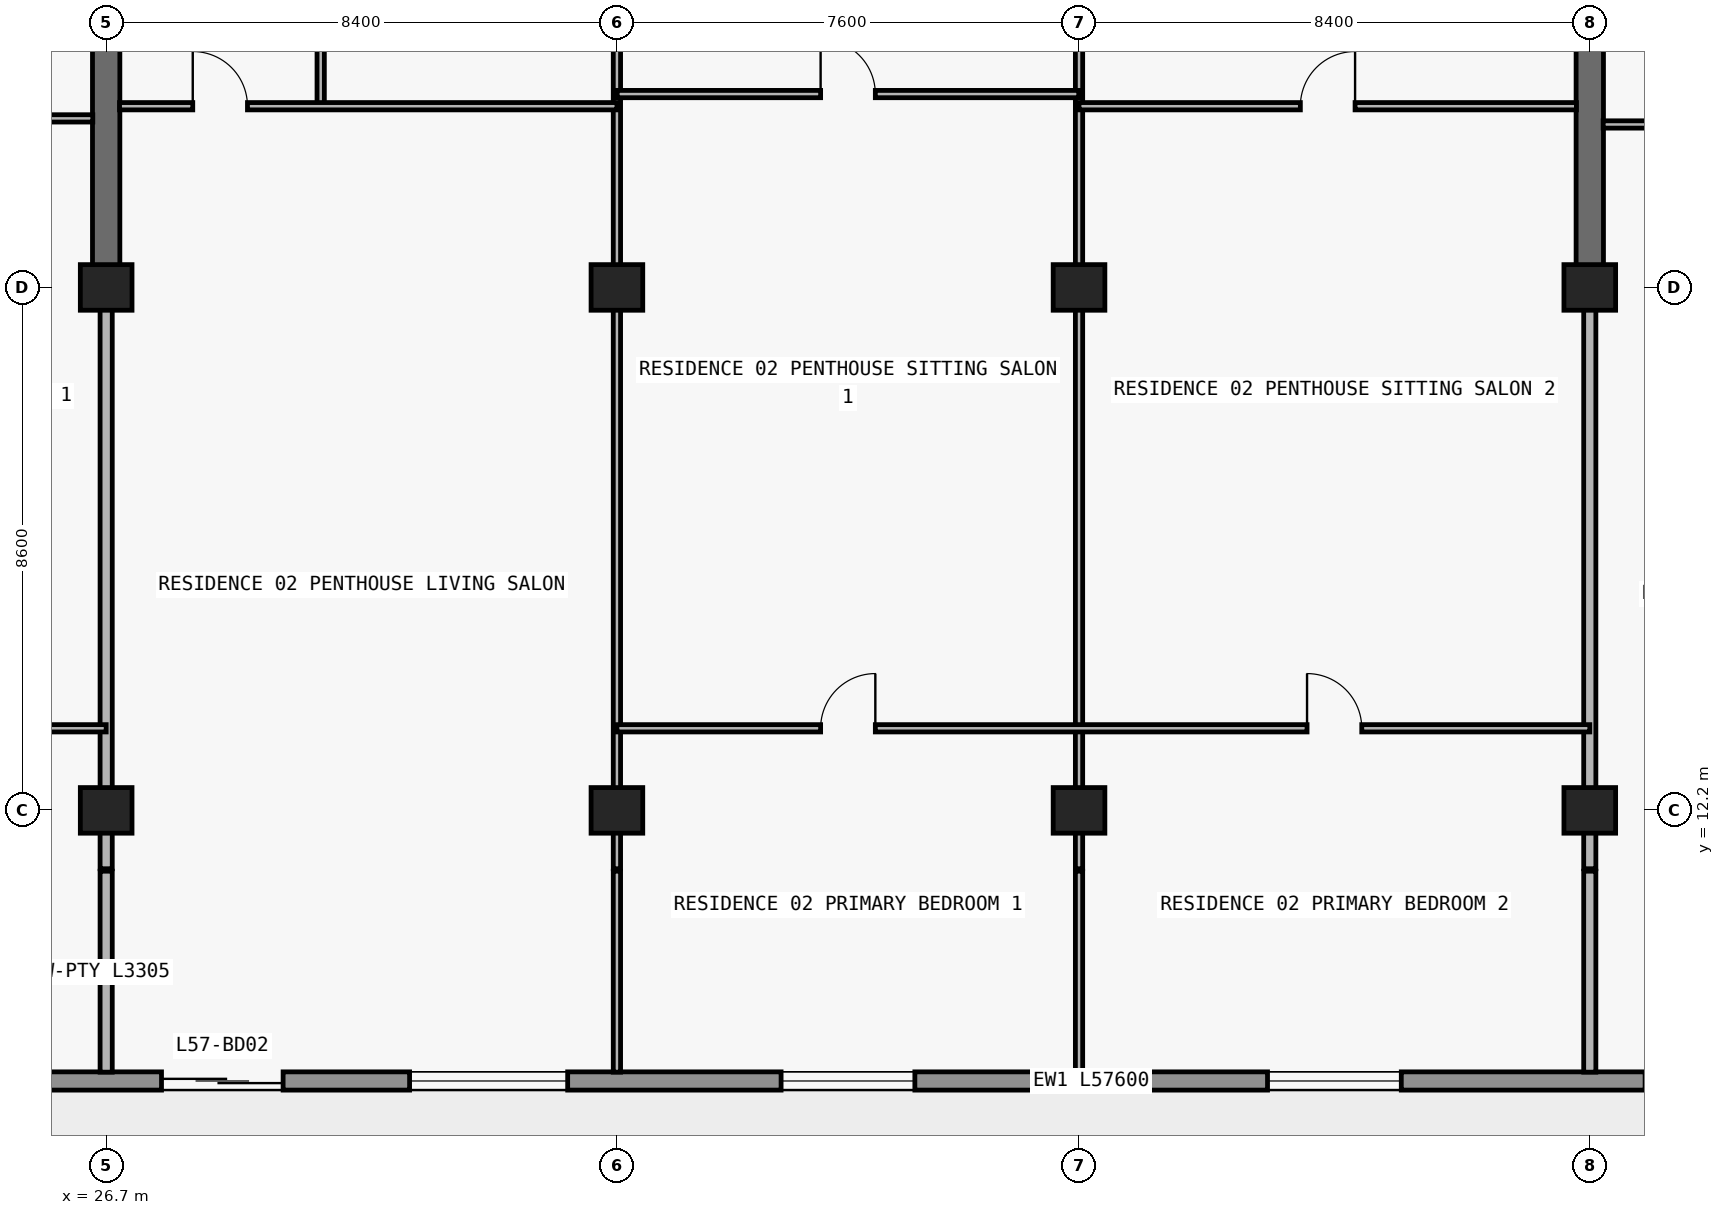
"""IFC4 building model, lengths in metres.
Left out: names, types, materials, properties, quantities, classifications, styles, units other than length and angle.
Written with IfcOpenShell. Run it as: python <this file> out.ifc"""

import sys

from ifc_helpers import new_model, si_unit, direction, frame, frame_2d, origin, origin_2d, place, context, subcontext, project, spatial, rectangle, extrude, element, fill, save


model = new_model("IFC4")
c1 = context("Model", 3, precision=1e-05, world=origin(), true_north=direction((0.0, 1.0)))
c2 = subcontext(c1, "Body", "Model", "MODEL_VIEW")
j1 = project(units=[si_unit("LENGTHUNIT", "METRE"), si_unit("PLANEANGLEUNIT", "RADIAN")], contexts=[c1])
p1 = place(None, origin())
s1 = spatial("IfcSite", under=j1, at=p1, CompositionType="ELEMENT")
p2 = place(p1, origin())
s2 = spatial("IfcBuilding", under=s1, at=p2, CompositionType="ELEMENT")
p3 = place(p2, frame((0.0, 0.0, 204.9)))
s3 = spatial("IfcBuildingStorey", under=s2, at=p3, CompositionType="ELEMENT", Elevation=204.9)
for number, where, z_axis, x_axis in (
    (1, (26.7, 12.2, 0.0), (0.0, 0.0, 1.0), (1.0, 0.0, 0.0)),
    (2, (35.1, 12.2, 0.0), (0.0, 0.0, 1.0), (1.0, 0.0, 0.0)),
    (3, (42.7, 12.2, 0.0), (0.0, 0.0, 1.0), (1.0, 0.0, 0.0)),
    (4, (51.1, 12.2, 0.0), (0.0, 0.0, 1.0), (1.0, 0.0, 0.0)),
    (5, (26.7, 20.8, 0.0), (0.0, 0.0, 1.0), (1.0, 0.0, 0.0)),
    (6, (35.1, 20.8, 0.0), (0.0, 0.0, 1.0), (1.0, 0.0, 0.0)),
    (7, (42.7, 20.8, 0.0), (0.0, 0.0, 1.0), (1.0, 0.0, 0.0)),
    (8, (51.1, 20.8, 0.0), (0.0, 0.0, 1.0), (1.0, 0.0, 0.0)),
):
    element("IfcColumn", number, at=place(p3, frame(where, z_axis=z_axis, x_axis=x_axis)), inside=s3, PredefinedType="COLUMN", context=c2, shape_type="SweptSolid", body=[
        extrude(rectangle(XDim=0.85, YDim=0.75, at=origin_2d()), origin(), (0.0, 0.0, 1.0), 3.05),
    ])
for number, where, z_axis, x_axis in (
    (9, (26.7, 20.8, 0.0), (0.0, 0.0, 1.0), (0.0, 1.0, 0.0)),
    (10, (51.1, 20.8, 0.0), (0.0, 0.0, 1.0), (0.0, 1.0, 0.0)),
):
    element("IfcWall", number, at=place(p3, frame(where, z_axis=z_axis, x_axis=x_axis)), inside=s3, PredefinedType="SHEAR", context=c2, shape_type="SweptSolid", body=[
        extrude(rectangle(XDim=8.6, YDim=0.45, at=frame_2d((4.3, 0.0))), origin(), (0.0, 0.0, 1.0), 3.05),
    ])
p4 = place(p3, frame((67.7, 7.75, 0.0), z_axis=(0.0, 0.0, 1.0), x_axis=(-1.0, 0.0, 0.0)))
e11 = element("IfcWall", 11, at=p4, inside=s3, PredefinedType="STANDARD", context=c2, shape_type="SweptSolid", body=[
    extrude(rectangle(XDim=57.6, YDim=0.3, at=frame_2d((28.8, 0.0))), origin(), (0.0, 0.0, 1.0), 3.05),
])
p5 = place(p4, frame((54.69, 0.0, 0.0)))
e12 = element("IfcOpeningElement", 12, at=p5, cuts=e11, PredefinedType="OPENING", context=c2, shape_type="SweptSolid", body=[
    extrude(rectangle(XDim=2.0, YDim=2.3, at=frame_2d((1.0, 1.15))), frame((0.0, 0.16, 0.0), z_axis=(0.0, -1.0, 0.0), x_axis=(1.0, 0.0, 0.0)), (0.0, 0.0, 1.0), 0.32),
])
p6 = place(p4, frame((50.21, 0.0, 0.65)))
e13 = element("IfcOpeningElement", 13, at=p6, cuts=e11, PredefinedType="OPENING", context=c2, shape_type="SweptSolid", body=[
    extrude(rectangle(XDim=2.6, YDim=1.85, at=frame_2d((1.3, 0.925))), frame((0.0, 0.16, 0.0), z_axis=(0.0, -1.0, 0.0), x_axis=(1.0, 0.0, 0.0)), (0.0, 0.0, 1.0), 0.32),
])
p7 = place(p4, frame((44.1, 0.0, 0.85)))
e14 = element("IfcOpeningElement", 14, at=p7, cuts=e11, PredefinedType="OPENING", context=c2, shape_type="SweptSolid", body=[
    extrude(rectangle(XDim=2.2, YDim=1.55, at=frame_2d((1.1, 0.775))), frame((0.0, 0.16, 0.0), z_axis=(0.0, -1.0, 0.0), x_axis=(1.0, 0.0, 0.0)), (0.0, 0.0, 1.0), 0.32),
])
p8 = place(p4, frame((38.09, 0.0, 0.0)))
e15 = element("IfcOpeningElement", 15, at=p8, cuts=e11, PredefinedType="OPENING", context=c2, shape_type="SweptSolid", body=[
    extrude(rectangle(XDim=2.0, YDim=2.3, at=frame_2d((1.0, 1.15))), frame((0.0, 0.16, 0.0), z_axis=(0.0, -1.0, 0.0), x_axis=(1.0, 0.0, 0.0)), (0.0, 0.0, 1.0), 0.32),
])
p9 = place(p4, frame((33.41, 0.0, 0.65)))
e16 = element("IfcOpeningElement", 16, at=p9, cuts=e11, PredefinedType="OPENING", context=c2, shape_type="SweptSolid", body=[
    extrude(rectangle(XDim=2.6, YDim=1.85, at=frame_2d((1.3, 0.925))), frame((0.0, 0.16, 0.0), z_axis=(0.0, -1.0, 0.0), x_axis=(1.0, 0.0, 0.0)), (0.0, 0.0, 1.0), 0.32),
])
p10 = place(p4, frame((27.7, 0.0, 0.85)))
e17 = element("IfcOpeningElement", 17, at=p10, cuts=e11, PredefinedType="OPENING", context=c2, shape_type="SweptSolid", body=[
    extrude(rectangle(XDim=2.2, YDim=1.55, at=frame_2d((1.1, 0.775))), frame((0.0, 0.16, 0.0), z_axis=(0.0, -1.0, 0.0), x_axis=(1.0, 0.0, 0.0)), (0.0, 0.0, 1.0), 0.32),
])
p11 = place(p4, frame((19.7, 0.0, 0.85)))
e18 = element("IfcOpeningElement", 18, at=p11, cuts=e11, PredefinedType="OPENING", context=c2, shape_type="SweptSolid", body=[
    extrude(rectangle(XDim=2.2, YDim=1.55, at=frame_2d((1.1, 0.775))), frame((0.0, 0.16, 0.0), z_axis=(0.0, -1.0, 0.0), x_axis=(1.0, 0.0, 0.0)), (0.0, 0.0, 1.0), 0.32),
])
p12 = place(p4, frame((13.69, 0.0, 0.0)))
e19 = element("IfcOpeningElement", 19, at=p12, cuts=e11, PredefinedType="OPENING", context=c2, shape_type="SweptSolid", body=[
    extrude(rectangle(XDim=2.0, YDim=2.3, at=frame_2d((1.0, 1.15))), frame((0.0, 0.16, 0.0), z_axis=(0.0, -1.0, 0.0), x_axis=(1.0, 0.0, 0.0)), (0.0, 0.0, 1.0), 0.32),
])
p13 = place(p4, frame((9.01, 0.0, 0.65)))
e20 = element("IfcOpeningElement", 20, at=p13, cuts=e11, PredefinedType="OPENING", context=c2, shape_type="SweptSolid", body=[
    extrude(rectangle(XDim=2.6, YDim=1.85, at=frame_2d((1.3, 0.925))), frame((0.0, 0.16, 0.0), z_axis=(0.0, -1.0, 0.0), x_axis=(1.0, 0.0, 0.0)), (0.0, 0.0, 1.0), 0.32),
])
p14 = place(p4, frame((3.0, 0.0, 0.85)))
e21 = element("IfcOpeningElement", 21, at=p14, cuts=e11, PredefinedType="OPENING", context=c2, shape_type="SweptSolid", body=[
    extrude(rectangle(XDim=2.2, YDim=1.55, at=frame_2d((1.1, 0.775))), frame((0.0, 0.16, 0.0), z_axis=(0.0, -1.0, 0.0), x_axis=(1.0, 0.0, 0.0)), (0.0, 0.0, 1.0), 0.32),
])
p15 = place(p3, frame((26.7, 7.895, 0.0), z_axis=(0.0, 0.0, 1.0), x_axis=(0.0, 1.0, 0.0)))
e22 = element("IfcWall", 22, at=p15, inside=s3, PredefinedType="PARTITIONING", context=c2, shape_type="SweptSolid", body=[
    extrude(rectangle(XDim=3.305, YDim=0.2, at=frame_2d((1.652, 0.0))), origin(), (0.0, 0.0, 1.0), 3.05),
])
p16 = place(p3, frame((26.7, 11.24, 0.0), z_axis=(0.0, 0.0, 1.0), x_axis=(0.0, 1.0, 0.0)))
e23 = element("IfcWall", 23, at=p16, inside=s3, PredefinedType="PARTITIONING", context=c2, shape_type="SweptSolid", body=[
    extrude(rectangle(XDim=9.555, YDim=0.2, at=frame_2d((4.777, 0.0))), origin(), (0.0, 0.0, 1.0), 2.263),
])
p17 = place(p3, frame((30.228, 23.78, 0.0), z_axis=(0.0, 0.0, 1.0), x_axis=(0.0, 1.0, 0.0)))
e24 = element("IfcWall", 24, at=p17, inside=s3, PredefinedType="PARTITIONING", context=c2, shape_type="SweptSolid", body=[
    extrude(rectangle(XDim=4.8, YDim=0.12, at=frame_2d((2.4, 0.0))), origin(), (0.0, 0.0, 1.0), 3.05),
])
p18 = place(p17, frame((1.95, 0.0, 0.0)))
e25 = element("IfcOpeningElement", 25, at=p18, cuts=e24, PredefinedType="OPENING", context=c2, shape_type="SweptSolid", body=[
    extrude(rectangle(XDim=0.9, YDim=2.15, at=frame_2d((0.45, 1.075))), frame((0.0, 0.07, 0.0), z_axis=(0.0, -1.0, 0.0), x_axis=(1.0, 0.0, 0.0)), (0.0, 0.0, 1.0), 0.14),
])
p19 = place(p3, frame((35.1, 7.895, 0.0), z_axis=(0.0, 0.0, 1.0), x_axis=(0.0, 1.0, 0.0)))
e26 = element("IfcWall", 26, at=p19, inside=s3, PredefinedType="PARTITIONING", context=c2, shape_type="SweptSolid", body=[
    extrude(rectangle(XDim=3.305, YDim=0.12, at=frame_2d((1.652, 0.0))), origin(), (0.0, 0.0, 1.0), 3.05),
])
p20 = place(p3, frame((35.1, 11.24, 0.0), z_axis=(0.0, 0.0, 1.0), x_axis=(0.0, 1.0, 0.0)))
e27 = element("IfcWall", 27, at=p20, inside=s3, PredefinedType="PARTITIONING", context=c2, shape_type="SweptSolid", body=[
    extrude(rectangle(XDim=22.76, YDim=0.12, at=frame_2d((11.38, 0.0))), origin(), (0.0, 0.0, 1.0), 2.263),
])
p21 = place(p20, frame((14.49, 0.0, 0.0)))
e28 = element("IfcOpeningElement", 28, at=p21, cuts=e27, PredefinedType="OPENING", context=c2, shape_type="SweptSolid", body=[
    extrude(rectangle(XDim=0.9, YDim=2.15, at=frame_2d((0.45, 1.075))), frame((0.0, 0.07, 0.0), z_axis=(0.0, -1.0, 0.0), x_axis=(1.0, 0.0, 0.0)), (0.0, 0.0, 1.0), 0.14),
])
p22 = place(p3, frame((42.7, 7.895, 0.0), z_axis=(0.0, 0.0, 1.0), x_axis=(0.0, 1.0, 0.0)))
e29 = element("IfcWall", 29, at=p22, inside=s3, PredefinedType="PARTITIONING", context=c2, shape_type="SweptSolid", body=[
    extrude(rectangle(XDim=3.305, YDim=0.12, at=frame_2d((1.652, 0.0))), origin(), (0.0, 0.0, 1.0), 3.05),
])
p23 = place(p3, frame((42.7, 11.24, 0.0), z_axis=(0.0, 0.0, 1.0), x_axis=(0.0, 1.0, 0.0)))
e30 = element("IfcWall", 30, at=p23, inside=s3, PredefinedType="PARTITIONING", context=c2, shape_type="SweptSolid", body=[
    extrude(rectangle(XDim=22.76, YDim=0.12, at=frame_2d((11.38, 0.0))), origin(), (0.0, 0.0, 1.0), 2.263),
])
p24 = place(p23, frame((14.49, 0.0, 0.0)))
e31 = element("IfcOpeningElement", 31, at=p24, cuts=e30, PredefinedType="OPENING", context=c2, shape_type="SweptSolid", body=[
    extrude(rectangle(XDim=0.9, YDim=2.15, at=frame_2d((0.45, 1.075))), frame((0.0, 0.07, 0.0), z_axis=(0.0, -1.0, 0.0), x_axis=(1.0, 0.0, 0.0)), (0.0, 0.0, 1.0), 0.14),
])
p25 = place(p3, frame((51.1, 7.895, 0.0), z_axis=(0.0, 0.0, 1.0), x_axis=(0.0, 1.0, 0.0)))
e32 = element("IfcWall", 32, at=p25, inside=s3, PredefinedType="PARTITIONING", context=c2, shape_type="SweptSolid", body=[
    extrude(rectangle(XDim=3.305, YDim=0.2, at=frame_2d((1.652, 0.0))), origin(), (0.0, 0.0, 1.0), 3.05),
])
p26 = place(p3, frame((51.1, 11.24, 0.0), z_axis=(0.0, 0.0, 1.0), x_axis=(0.0, 1.0, 0.0)))
e33 = element("IfcWall", 33, at=p26, inside=s3, PredefinedType="PARTITIONING", context=c2, shape_type="SweptSolid", body=[
    extrude(rectangle(XDim=9.555, YDim=0.2, at=frame_2d((4.777, 0.0))), origin(), (0.0, 0.0, 1.0), 2.263),
])
p27 = place(p3, frame((18.3, 13.55, 0.0), z_axis=(0.0, 0.0, 1.0), x_axis=(1.0, 0.0, 0.0)))
e34 = element("IfcWall", 34, at=p27, inside=s3, PredefinedType="PARTITIONING", context=c2, shape_type="SweptSolid", body=[
    extrude(rectangle(XDim=8.4, YDim=0.12, at=frame_2d((4.2, 0.0))), origin(), (0.0, 0.0, 1.0), 3.05),
])
p28 = place(p27, frame((3.75, 0.0, 0.0)))
e35 = element("IfcOpeningElement", 35, at=p28, cuts=e34, PredefinedType="OPENING", context=c2, shape_type="SweptSolid", body=[
    extrude(rectangle(XDim=0.9, YDim=2.15, at=frame_2d((0.45, 1.075))), frame((0.0, 0.07, 0.0), z_axis=(0.0, -1.0, 0.0), x_axis=(1.0, 0.0, 0.0)), (0.0, 0.0, 1.0), 0.14),
])
p29 = place(p3, frame((35.1, 13.55, 0.0), z_axis=(0.0, 0.0, 1.0), x_axis=(1.0, 0.0, 0.0)))
e36 = element("IfcWall", 36, at=p29, inside=s3, PredefinedType="PARTITIONING", context=c2, shape_type="SweptSolid", body=[
    extrude(rectangle(XDim=16.0, YDim=0.12, at=frame_2d((8.0, 0.0))), origin(), (0.0, 0.0, 1.0), 3.05),
])
p30 = place(p29, frame((3.35, 0.0, 0.0)))
e37 = element("IfcOpeningElement", 37, at=p30, cuts=e36, PredefinedType="OPENING", context=c2, shape_type="SweptSolid", body=[
    extrude(rectangle(XDim=0.9, YDim=2.15, at=frame_2d((0.45, 1.075))), frame((0.0, 0.07, 0.0), z_axis=(0.0, -1.0, 0.0), x_axis=(1.0, 0.0, 0.0)), (0.0, 0.0, 1.0), 0.14),
])
p31 = place(p29, frame((11.35, 0.0, 0.0)))
e38 = element("IfcOpeningElement", 38, at=p31, cuts=e36, PredefinedType="OPENING", context=c2, shape_type="SweptSolid", body=[
    extrude(rectangle(XDim=0.9, YDim=2.15, at=frame_2d((0.45, 1.075))), frame((0.0, 0.07, 0.0), z_axis=(0.0, -1.0, 0.0), x_axis=(1.0, 0.0, 0.0)), (0.0, 0.0, 1.0), 0.14),
])
p32 = place(p3, frame((51.32, 23.48, 0.0), z_axis=(0.0, 0.0, 1.0), x_axis=(1.0, 0.0, 0.0)))
e39 = element("IfcWall", 39, at=p32, inside=s3, PredefinedType="PARTITIONING", context=c2, shape_type="SweptSolid", body=[
    extrude(rectangle(XDim=8.18, YDim=0.12, at=frame_2d((4.09, 0.0))), origin(), (0.0, 0.0, 1.0), 3.05),
])
p33 = place(p32, frame((1.33, 0.0, 0.0)))
e40 = element("IfcOpeningElement", 40, at=p33, cuts=e39, PredefinedType="OPENING", context=c2, shape_type="SweptSolid", body=[
    extrude(rectangle(XDim=0.9, YDim=2.15, at=frame_2d((0.45, 1.075))), frame((0.0, 0.07, 0.0), z_axis=(0.0, -1.0, 0.0), x_axis=(1.0, 0.0, 0.0)), (0.0, 0.0, 1.0), 0.14),
])
p34 = place(p3, frame((18.305, 23.58, 0.0), z_axis=(0.0, 0.0, 1.0), x_axis=(1.0, 0.0, 0.0)))
e41 = element("IfcWall", 41, at=p34, inside=s3, PredefinedType="PARTITIONING", context=c2, shape_type="SweptSolid", body=[
    extrude(rectangle(XDim=8.175, YDim=0.12, at=frame_2d((4.087, 0.0))), origin(), (0.0, 0.0, 1.0), 3.05),
])
p35 = place(p34, frame((3.637, 0.0, 0.0)))
e42 = element("IfcOpeningElement", 42, at=p35, cuts=e41, PredefinedType="OPENING", context=c2, shape_type="SweptSolid", body=[
    extrude(rectangle(XDim=0.9, YDim=2.15, at=frame_2d((0.45, 1.075))), frame((0.0, 0.07, 0.0), z_axis=(0.0, -1.0, 0.0), x_axis=(1.0, 0.0, 0.0)), (0.0, 0.0, 1.0), 0.14),
])
p36 = place(p3, frame((26.92, 23.78, 0.0), z_axis=(0.0, 0.0, 1.0), x_axis=(1.0, 0.0, 0.0)))
e43 = element("IfcWall", 43, at=p36, inside=s3, PredefinedType="PARTITIONING", context=c2, shape_type="SweptSolid", body=[
    extrude(rectangle(XDim=8.18, YDim=0.12, at=frame_2d((4.09, 0.0))), origin(), (0.0, 0.0, 1.0), 3.05),
])
p37 = place(p36, frame((1.204, 0.0, 0.0)))
e44 = element("IfcOpeningElement", 44, at=p37, cuts=e43, PredefinedType="OPENING", context=c2, shape_type="SweptSolid", body=[
    extrude(rectangle(XDim=0.9, YDim=2.15, at=frame_2d((0.45, 1.075))), frame((0.0, 0.07, 0.0), z_axis=(0.0, -1.0, 0.0), x_axis=(1.0, 0.0, 0.0)), (0.0, 0.0, 1.0), 0.14),
])
p38 = place(p3, frame((42.7, 23.78, 0.0), z_axis=(0.0, 0.0, 1.0), x_axis=(1.0, 0.0, 0.0)))
e45 = element("IfcWall", 45, at=p38, inside=s3, PredefinedType="PARTITIONING", context=c2, shape_type="SweptSolid", body=[
    extrude(rectangle(XDim=8.18, YDim=0.12, at=frame_2d((4.09, 0.0))), origin(), (0.0, 0.0, 1.0), 3.05),
])
p39 = place(p38, frame((3.64, 0.0, 0.0)))
e46 = element("IfcOpeningElement", 46, at=p39, cuts=e45, PredefinedType="OPENING", context=c2, shape_type="SweptSolid", body=[
    extrude(rectangle(XDim=0.9, YDim=2.15, at=frame_2d((0.45, 1.075))), frame((0.0, 0.07, 0.0), z_axis=(0.0, -1.0, 0.0), x_axis=(1.0, 0.0, 0.0)), (0.0, 0.0, 1.0), 0.14),
])
p40 = place(p3, frame((35.105, 23.98, 0.0), z_axis=(0.0, 0.0, 1.0), x_axis=(1.0, 0.0, 0.0)))
e47 = element("IfcWall", 47, at=p40, inside=s3, PredefinedType="PARTITIONING", context=c2, shape_type="SweptSolid", body=[
    extrude(rectangle(XDim=7.59, YDim=0.12, at=frame_2d((3.795, 0.0))), origin(), (0.0, 0.0, 1.0), 3.05),
])
p41 = place(p40, frame((3.345, 0.0, 0.0)))
e48 = element("IfcOpeningElement", 48, at=p41, cuts=e47, PredefinedType="OPENING", context=c2, shape_type="SweptSolid", body=[
    extrude(rectangle(XDim=0.9, YDim=2.15, at=frame_2d((0.45, 1.075))), frame((0.0, 0.07, 0.0), z_axis=(0.0, -1.0, 0.0), x_axis=(1.0, 0.0, 0.0)), (0.0, 0.0, 1.0), 0.14),
])
p42 = place(p8, origin())
e49 = element("IfcDoor", 49, at=p42, inside=s3, OperationType="DOUBLE_DOOR_SLIDING", PredefinedType="DOOR", context=c2, shape_type="SweptSolid", body=[
    extrude(rectangle(XDim=2.0, YDim=2.3, at=frame_2d((1.0, 1.15))), frame((0.0, 0.025, 0.0), z_axis=(0.0, -1.0, 0.0), x_axis=(1.0, 0.0, 0.0)), (0.0, 0.0, 1.0), 0.05),
])
fill(e15, e49)
p43 = place(p9, origin())
e50 = element("IfcWindow", 50, at=p43, inside=s3, PartitioningType="SINGLE_PANEL", PredefinedType="WINDOW", context=c2, shape_type="SweptSolid", body=[
    extrude(rectangle(XDim=2.6, YDim=1.85, at=frame_2d((1.3, 0.925))), frame((0.0, 0.03, 0.0), z_axis=(0.0, -1.0, 0.0), x_axis=(1.0, 0.0, 0.0)), (0.0, 0.0, 1.0), 0.06),
])
fill(e16, e50)
p44 = place(p10, origin())
e51 = element("IfcWindow", 51, at=p44, inside=s3, PartitioningType="SINGLE_PANEL", PredefinedType="WINDOW", context=c2, shape_type="SweptSolid", body=[
    extrude(rectangle(XDim=2.2, YDim=1.55, at=frame_2d((1.1, 0.775))), frame((0.0, 0.03, 0.0), z_axis=(0.0, -1.0, 0.0), x_axis=(1.0, 0.0, 0.0)), (0.0, 0.0, 1.0), 0.06),
])
fill(e17, e51)
p45 = place(p11, origin())
e52 = element("IfcWindow", 52, at=p45, inside=s3, PartitioningType="SINGLE_PANEL", PredefinedType="WINDOW", context=c2, shape_type="SweptSolid", body=[
    extrude(rectangle(XDim=2.2, YDim=1.55, at=frame_2d((1.1, 0.775))), frame((0.0, 0.03, 0.0), z_axis=(0.0, -1.0, 0.0), x_axis=(1.0, 0.0, 0.0)), (0.0, 0.0, 1.0), 0.06),
])
fill(e18, e52)
p46 = place(p37, origin())
e53 = element("IfcDoor", 53, at=p46, inside=s3, OperationType="SINGLE_SWING_LEFT", PredefinedType="DOOR", context=c2, shape_type="SweptSolid", body=[
    extrude(rectangle(XDim=0.9, YDim=2.15, at=frame_2d((0.45, 1.075))), frame((0.0, 0.025, 0.0), z_axis=(0.0, -1.0, 0.0), x_axis=(1.0, 0.0, 0.0)), (0.0, 0.0, 1.0), 0.05),
])
fill(e44, e53)
p47 = place(p41, origin())
e54 = element("IfcDoor", 54, at=p47, inside=s3, OperationType="SINGLE_SWING_LEFT", PredefinedType="DOOR", context=c2, shape_type="SweptSolid", body=[
    extrude(rectangle(XDim=0.9, YDim=2.15, at=frame_2d((0.45, 1.075))), frame((0.0, 0.025, 0.0), z_axis=(0.0, -1.0, 0.0), x_axis=(1.0, 0.0, 0.0)), (0.0, 0.0, 1.0), 0.05),
])
fill(e48, e54)
p48 = place(p30, origin())
e55 = element("IfcDoor", 55, at=p48, inside=s3, OperationType="SINGLE_SWING_RIGHT", PredefinedType="DOOR", context=c2, shape_type="SweptSolid", body=[
    extrude(rectangle(XDim=0.9, YDim=2.15, at=frame_2d((0.45, 1.075))), frame((0.0, 0.025, 0.0), z_axis=(0.0, -1.0, 0.0), x_axis=(1.0, 0.0, 0.0)), (0.0, 0.0, 1.0), 0.05),
])
fill(e37, e55)
p49 = place(p39, origin())
e56 = element("IfcDoor", 56, at=p49, inside=s3, OperationType="SINGLE_SWING_RIGHT", PredefinedType="DOOR", context=c2, shape_type="SweptSolid", body=[
    extrude(rectangle(XDim=0.9, YDim=2.15, at=frame_2d((0.45, 1.075))), frame((0.0, 0.025, 0.0), z_axis=(0.0, -1.0, 0.0), x_axis=(1.0, 0.0, 0.0)), (0.0, 0.0, 1.0), 0.05),
])
fill(e46, e56)
p50 = place(p31, origin())
e57 = element("IfcDoor", 57, at=p50, inside=s3, OperationType="SINGLE_SWING_LEFT", PredefinedType="DOOR", context=c2, shape_type="SweptSolid", body=[
    extrude(rectangle(XDim=0.9, YDim=2.15, at=frame_2d((0.45, 1.075))), frame((0.0, 0.025, 0.0), z_axis=(0.0, -1.0, 0.0), x_axis=(1.0, 0.0, 0.0)), (0.0, 0.0, 1.0), 0.05),
])
fill(e38, e57)
save(model, sys.argv[1])
